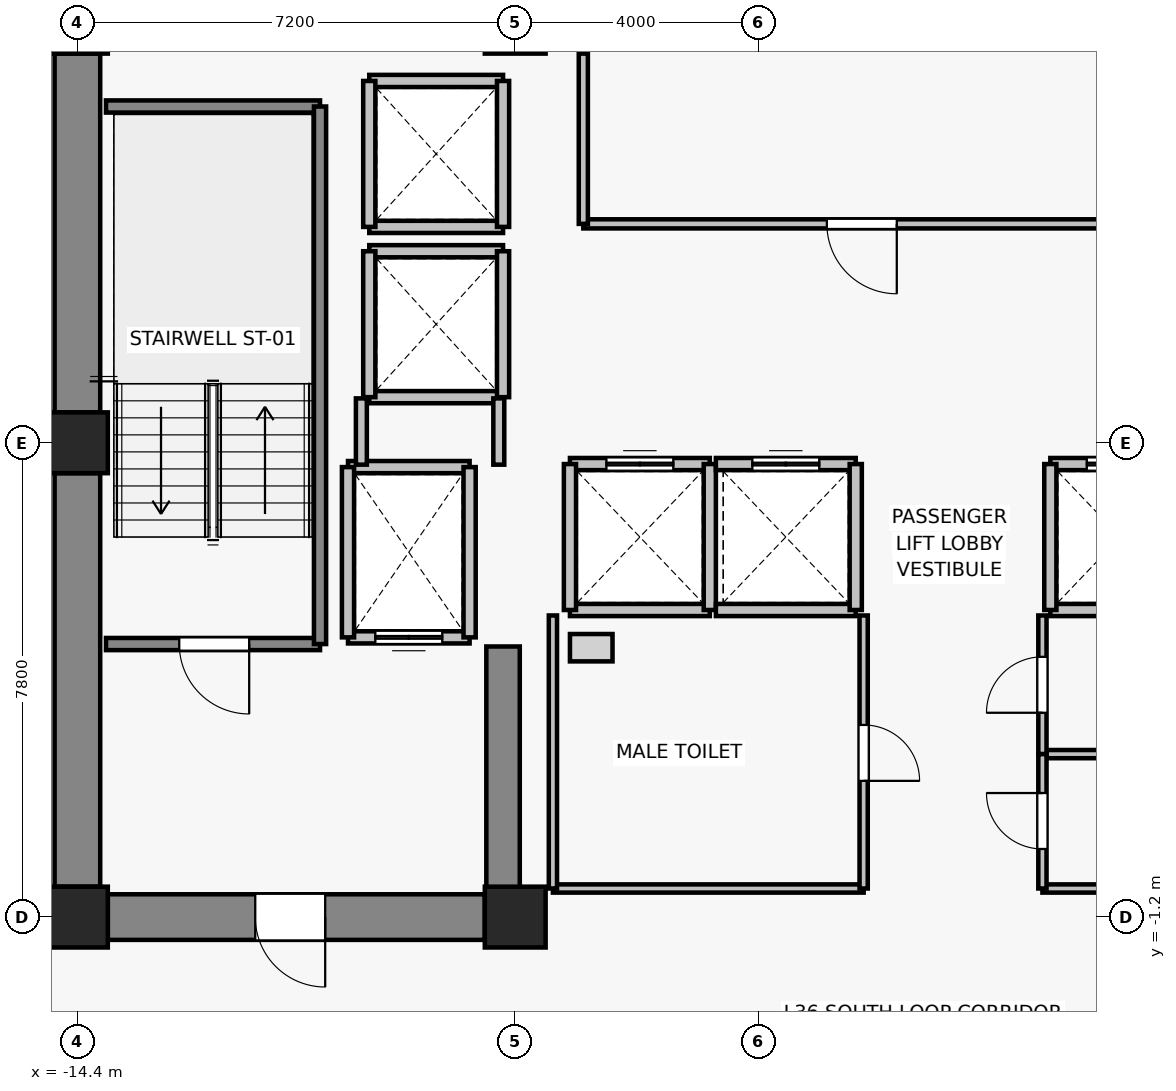
"""IFC4 building model, lengths in metres.
Left out: names, types, materials, properties, quantities, classifications, styles, units other than length and angle.
Written with IfcOpenShell. Run it as: python <this file> out.ifc"""

import sys

from ifc_helpers import new_model, si_unit, direction, frame, frame_2d, origin, origin_2d, place, context, subcontext, project, spatial, rectangle, extrude, source, transform, mapped, element, fill, save


model = new_model("IFC4")
c1 = context("Model", 3, precision=1e-05, world=origin(), true_north=direction((0.0, 1.0)))
c2 = subcontext(c1, "Body", "Model", "MODEL_VIEW")
j1 = project(units=[si_unit("LENGTHUNIT", "METRE"), si_unit("PLANEANGLEUNIT", "RADIAN")], contexts=[c1])
p1 = place(None, origin())
s1 = spatial("IfcSite", under=j1, at=p1, CompositionType="ELEMENT")
p2 = place(p1, origin())
s2 = spatial("IfcBuilding", under=s1, at=p2, CompositionType="ELEMENT")
p3 = place(p2, frame((0.0, 0.0, 129.7)))
s3 = spatial("IfcBuildingStorey", under=s2, at=p3, CompositionType="ELEMENT", Elevation=129.7)
for number, where, z_axis, x_axis in (
    (1, (-14.4, -1.2, 0.0), (0.0, 0.0, 1.0), (1.0, 0.0, 0.0)),
    (2, (-7.2, -1.2, 0.0), (0.0, 0.0, 1.0), (1.0, 0.0, 0.0)),
    (3, (-14.4, 6.6, 0.0), (0.0, 0.0, 1.0), (1.0, 0.0, 0.0)),
    (4, (-14.4, 13.5, 0.0), (0.0, 0.0, 1.0), (1.0, 0.0, 0.0)),
    (5, (-7.2, 13.5, 0.0), (0.0, 0.0, 1.0), (1.0, 0.0, 0.0)),
):
    element("IfcColumn", number, at=place(p3, frame(where, z_axis=z_axis, x_axis=x_axis)), inside=s3, PredefinedType="COLUMN", context=c2, shape_type="SweptSolid", body=[
        extrude(rectangle(XDim=1.0, YDim=1.0, at=origin_2d()), origin(), (0.0, 0.0, 1.0), 3.3),
    ])
p4 = place(p3, frame((-14.4, -0.7, 0.0), z_axis=(0.0, 0.0, 1.0), x_axis=(0.0, 1.0, 0.0)))
e6 = element("IfcWall", 6, at=p4, inside=s3, PredefinedType="SHEAR", context=c2, shape_type="SweptSolid", body=[
    extrude(rectangle(XDim=6.8, YDim=0.75, at=frame_2d((3.4, 0.0))), origin(), (0.0, 0.0, 1.0), 3.075),
])
p5 = place(p3, frame((-14.4, 7.1, 0.0), z_axis=(0.0, 0.0, 1.0), x_axis=(0.0, 1.0, 0.0)))
e7 = element("IfcWall", 7, at=p5, inside=s3, PredefinedType="SHEAR", context=c2, shape_type="SweptSolid", body=[
    extrude(rectangle(XDim=5.9, YDim=0.75, at=frame_2d((2.95, 0.0))), origin(), (0.0, 0.0, 1.0), 3.075),
])
p6 = place(p3, frame((-7.7, -1.2, 0.0), z_axis=(0.0, 0.0, 1.0), x_axis=(-1.0, 0.0, 0.0)))
e8 = element("IfcWall", 8, at=p6, inside=s3, PredefinedType="SHEAR", context=c2, shape_type="SweptSolid", body=[
    extrude(rectangle(XDim=6.2, YDim=0.75, at=frame_2d((3.1, 0.0))), origin(), (0.0, 0.0, 1.0), 3.075),
])
p7 = place(p6, frame((2.625, 0.0, 0.0)))
e9 = element("IfcOpeningElement", 9, at=p7, cuts=e8, PredefinedType="OPENING", context=c2, shape_type="SweptSolid", body=[
    extrude(rectangle(XDim=1.15, YDim=2.15, at=frame_2d((0.575, 1.075))), frame((0.0, 0.385, 0.0), z_axis=(0.0, -1.0, 0.0), x_axis=(1.0, 0.0, 0.0)), (0.0, 0.0, 1.0), 0.77),
])
p8 = place(p3, frame((-7.4, -0.825, 0.0), z_axis=(0.0, 0.0, 1.0), x_axis=(0.0, 1.0, 0.0)))
e10 = element("IfcWall", 10, at=p8, inside=s3, PredefinedType="SHEAR", context=c2, shape_type="SweptSolid", body=[
    extrude(rectangle(XDim=4.075, YDim=0.55, at=frame_2d((2.038, 0.0))), origin(), (0.0, 0.0, 1.0), 3.075),
])
p9 = place(p3, frame((-7.95, 3.4, 0.0), z_axis=(0.0, 0.0, 1.0), x_axis=(-1.0, 0.0, 0.0)))
e11 = element("IfcWall", 11, at=p9, inside=s3, PredefinedType="SOLIDWALL", context=c2, shape_type="SweptSolid", body=[
    extrude(rectangle(XDim=2.0, YDim=0.2, at=frame_2d((1.0, 0.0))), origin(), (0.0, 0.0, 1.0), 3.075),
])
p10 = place(p9, frame((0.45, 0.0, 0.0)))
e12 = element("IfcOpeningElement", 12, at=p10, cuts=e11, PredefinedType="OPENING", context=c2, shape_type="SweptSolid", body=[
    extrude(rectangle(XDim=1.1, YDim=2.2, at=frame_2d((0.55, 1.1))), frame((0.0, 0.11, 0.0), z_axis=(0.0, -1.0, 0.0), x_axis=(1.0, 0.0, 0.0)), (0.0, 0.0, 1.0), 0.22),
])
p11 = place(p3, frame((-9.95, 6.2, 0.0), z_axis=(0.0, 0.0, 1.0), x_axis=(1.0, 0.0, 0.0)))
e13 = element("IfcWall", 13, at=p11, inside=s3, PredefinedType="SOLIDWALL", context=c2, shape_type="SweptSolid", body=[
    extrude(rectangle(XDim=2.0, YDim=0.2, at=frame_2d((1.0, 0.0))), origin(), (0.0, 0.0, 1.0), 3.075),
])
for number, where, z_axis, x_axis in (
    (14, (-9.95, 3.4, 0.0), (0.0, 0.0, 1.0), (0.0, 1.0, 0.0)),
    (15, (-7.95, 6.2, 0.0), (0.0, 0.0, 1.0), (0.0, -1.0, 0.0)),
):
    element("IfcWall", number, at=place(p3, frame(where, z_axis=z_axis, x_axis=x_axis)), inside=s3, PredefinedType="SOLIDWALL", context=c2, shape_type="SweptSolid", body=[
        extrude(rectangle(XDim=2.8, YDim=0.2, at=frame_2d((1.4, 0.0))), origin(), (0.0, 0.0, 1.0), 3.075),
    ])
p12 = place(p3, frame((-4.0, 3.85, 0.0), z_axis=(0.0, 0.0, 1.0), x_axis=(-1.0, 0.0, 0.0)))
e16 = element("IfcWall", 16, at=p12, inside=s3, PredefinedType="SOLIDWALL", context=c2, shape_type="SweptSolid", body=[
    extrude(rectangle(XDim=2.3, YDim=0.2, at=frame_2d((1.15, 0.0))), origin(), (0.0, 0.0, 1.0), 3.075),
])
p13 = place(p3, frame((-6.3, 6.25, 0.0), z_axis=(0.0, 0.0, 1.0), x_axis=(1.0, 0.0, 0.0)))
e17 = element("IfcWall", 17, at=p13, inside=s3, PredefinedType="SOLIDWALL", context=c2, shape_type="SweptSolid", body=[
    extrude(rectangle(XDim=2.3, YDim=0.2, at=frame_2d((1.15, 0.0))), origin(), (0.0, 0.0, 1.0), 3.075),
])
p14 = place(p13, frame((0.6, 0.0, 0.0)))
e18 = element("IfcOpeningElement", 18, at=p14, cuts=e17, PredefinedType="OPENING", context=c2, shape_type="SweptSolid", body=[
    extrude(rectangle(XDim=1.1, YDim=2.2, at=frame_2d((0.55, 1.1))), frame((0.0, 0.11, 0.0), z_axis=(0.0, -1.0, 0.0), x_axis=(1.0, 0.0, 0.0)), (0.0, 0.0, 1.0), 0.22),
])
for number, where, z_axis, x_axis in (
    (19, (-6.3, 3.85, 0.0), (0.0, 0.0, 1.0), (0.0, 1.0, 0.0)),
    (20, (-4.0, 6.25, 0.0), (0.0, 0.0, 1.0), (0.0, -1.0, 0.0)),
):
    element("IfcWall", number, at=place(p3, frame(where, z_axis=z_axis, x_axis=x_axis)), inside=s3, PredefinedType="SOLIDWALL", context=c2, shape_type="SweptSolid", body=[
        extrude(rectangle(XDim=2.4, YDim=0.2, at=frame_2d((1.2, 0.0))), origin(), (0.0, 0.0, 1.0), 3.075),
    ])
p15 = place(p3, frame((-1.6, 3.85, 0.0), z_axis=(0.0, 0.0, 1.0), x_axis=(-1.0, 0.0, 0.0)))
e21 = element("IfcWall", 21, at=p15, inside=s3, PredefinedType="SOLIDWALL", context=c2, shape_type="SweptSolid", body=[
    extrude(rectangle(XDim=2.3, YDim=0.2, at=frame_2d((1.15, 0.0))), origin(), (0.0, 0.0, 1.0), 3.075),
])
p16 = place(p3, frame((-3.9, 6.25, 0.0), z_axis=(0.0, 0.0, 1.0), x_axis=(1.0, 0.0, 0.0)))
e22 = element("IfcWall", 22, at=p16, inside=s3, PredefinedType="SOLIDWALL", context=c2, shape_type="SweptSolid", body=[
    extrude(rectangle(XDim=2.3, YDim=0.2, at=frame_2d((1.15, 0.0))), origin(), (0.0, 0.0, 1.0), 3.075),
])
p17 = place(p16, frame((0.6, 0.0, 0.0)))
e23 = element("IfcOpeningElement", 23, at=p17, cuts=e22, PredefinedType="OPENING", context=c2, shape_type="SweptSolid", body=[
    extrude(rectangle(XDim=1.1, YDim=2.2, at=frame_2d((0.55, 1.1))), frame((0.0, 0.11, 0.0), z_axis=(0.0, -1.0, 0.0), x_axis=(1.0, 0.0, 0.0)), (0.0, 0.0, 1.0), 0.22),
])
p18 = place(p3, frame((-1.6, 6.25, 0.0), z_axis=(0.0, 0.0, 1.0), x_axis=(0.0, -1.0, 0.0)))
e24 = element("IfcWall", 24, at=p18, inside=s3, PredefinedType="SOLIDWALL", context=c2, shape_type="SweptSolid", body=[
    extrude(rectangle(XDim=2.4, YDim=0.2, at=frame_2d((1.2, 0.0))), origin(), (0.0, 0.0, 1.0), 3.075),
])
p19 = place(p3, frame((3.9, 3.85, 0.0), z_axis=(0.0, 0.0, 1.0), x_axis=(-1.0, 0.0, 0.0)))
e25 = element("IfcWall", 25, at=p19, inside=s3, PredefinedType="SOLIDWALL", context=c2, shape_type="SweptSolid", body=[
    extrude(rectangle(XDim=2.3, YDim=0.2, at=frame_2d((1.15, 0.0))), origin(), (0.0, 0.0, 1.0), 3.075),
])
p20 = place(p3, frame((1.6, 6.25, 0.0), z_axis=(0.0, 0.0, 1.0), x_axis=(1.0, 0.0, 0.0)))
e26 = element("IfcWall", 26, at=p20, inside=s3, PredefinedType="SOLIDWALL", context=c2, shape_type="SweptSolid", body=[
    extrude(rectangle(XDim=2.3, YDim=0.2, at=frame_2d((1.15, 0.0))), origin(), (0.0, 0.0, 1.0), 3.075),
])
p21 = place(p20, frame((0.6, 0.0, 0.0)))
e27 = element("IfcOpeningElement", 27, at=p21, cuts=e26, PredefinedType="OPENING", context=c2, shape_type="SweptSolid", body=[
    extrude(rectangle(XDim=1.1, YDim=2.2, at=frame_2d((0.55, 1.1))), frame((0.0, 0.11, 0.0), z_axis=(0.0, -1.0, 0.0), x_axis=(1.0, 0.0, 0.0)), (0.0, 0.0, 1.0), 0.22),
])
p22 = place(p3, frame((1.6, 3.85, 0.0), z_axis=(0.0, 0.0, 1.0), x_axis=(0.0, 1.0, 0.0)))
e28 = element("IfcWall", 28, at=p22, inside=s3, PredefinedType="SOLIDWALL", context=c2, shape_type="SweptSolid", body=[
    extrude(rectangle(XDim=2.4, YDim=0.2, at=frame_2d((1.2, 0.0))), origin(), (0.0, 0.0, 1.0), 3.075),
])
for number, where, z_axis, x_axis in (
    (29, (-7.4, 7.35, 0.0), (0.0, 0.0, 1.0), (-1.0, 0.0, 0.0)),
    (30, (-9.6, 9.75, 0.0), (0.0, 0.0, 1.0), (1.0, 0.0, 0.0)),
):
    element("IfcWall", number, at=place(p3, frame(where, z_axis=z_axis, x_axis=x_axis)), inside=s3, PredefinedType="SOLIDWALL", context=c2, shape_type="SweptSolid", body=[
        extrude(rectangle(XDim=2.2, YDim=0.2, at=frame_2d((1.1, 0.0))), origin(), (0.0, 0.0, 1.0), 2.515),
    ])
p23 = place(p3, frame((-9.6, 7.35, 0.0), z_axis=(0.0, 0.0, 1.0), x_axis=(0.0, 1.0, 0.0)))
e31 = element("IfcWall", 31, at=p23, inside=s3, PredefinedType="SOLIDWALL", context=c2, shape_type="SweptSolid", body=[
    extrude(rectangle(XDim=2.4, YDim=0.2, at=frame_2d((1.2, 0.0))), origin(), (0.0, 0.0, 1.0), 3.075),
])
p24 = place(p3, frame((-7.4, 9.75, 0.0), z_axis=(0.0, 0.0, 1.0), x_axis=(0.0, -1.0, 0.0)))
e32 = element("IfcWall", 32, at=p24, inside=s3, PredefinedType="SOLIDWALL", context=c2, shape_type="SweptSolid", body=[
    extrude(rectangle(XDim=2.4, YDim=0.2, at=frame_2d((1.2, 0.0))), origin(), (0.0, 0.0, 1.0), 2.515),
])
for number, where, z_axis, x_axis in (
    (33, (-7.4, 10.15, 0.0), (0.0, 0.0, 1.0), (-1.0, 0.0, 0.0)),
    (34, (-9.6, 12.55, 0.0), (0.0, 0.0, 1.0), (1.0, 0.0, 0.0)),
):
    element("IfcWall", number, at=place(p3, frame(where, z_axis=z_axis, x_axis=x_axis)), inside=s3, PredefinedType="SOLIDWALL", context=c2, shape_type="SweptSolid", body=[
        extrude(rectangle(XDim=2.2, YDim=0.2, at=frame_2d((1.1, 0.0))), origin(), (0.0, 0.0, 1.0), 2.515),
    ])
p25 = place(p3, frame((-9.6, 10.15, 0.0), z_axis=(0.0, 0.0, 1.0), x_axis=(0.0, 1.0, 0.0)))
e35 = element("IfcWall", 35, at=p25, inside=s3, PredefinedType="SOLIDWALL", context=c2, shape_type="SweptSolid", body=[
    extrude(rectangle(XDim=2.4, YDim=0.2, at=frame_2d((1.2, 0.0))), origin(), (0.0, 0.0, 1.0), 3.075),
])
p26 = place(p3, frame((-7.4, 12.55, 0.0), z_axis=(0.0, 0.0, 1.0), x_axis=(0.0, -1.0, 0.0)))
e36 = element("IfcWall", 36, at=p26, inside=s3, PredefinedType="SOLIDWALL", context=c2, shape_type="SweptSolid", body=[
    extrude(rectangle(XDim=2.4, YDim=0.2, at=frame_2d((1.2, 0.0))), origin(), (0.0, 0.0, 1.0), 2.515),
])
p27 = place(p3, frame((-10.41, 3.29, 0.0), z_axis=(0.0, 0.0, 1.0), x_axis=(-1.0, 0.0, 0.0)))
e37 = element("IfcWall", 37, at=p27, inside=s3, PredefinedType="SOLIDWALL", context=c2, shape_type="SweptSolid", body=[
    extrude(rectangle(XDim=3.52, YDim=0.2, at=frame_2d((1.76, 0.0))), origin(), (0.0, 0.0, 1.0), 3.075),
])
p28 = place(p27, frame((1.165, 0.0, 0.0)))
e38 = element("IfcOpeningElement", 38, at=p28, cuts=e37, PredefinedType="OPENING", context=c2, shape_type="SweptSolid", body=[
    extrude(rectangle(XDim=1.15, YDim=2.15, at=frame_2d((0.575, 1.075))), frame((0.0, 0.11, 0.0), z_axis=(0.0, -1.0, 0.0), x_axis=(1.0, 0.0, 0.0)), (0.0, 0.0, 1.0), 0.22),
])
p29 = place(p3, frame((-13.93, 12.13, 0.0), z_axis=(0.0, 0.0, 1.0), x_axis=(1.0, 0.0, 0.0)))
e39 = element("IfcWall", 39, at=p29, inside=s3, PredefinedType="SOLIDWALL", context=c2, shape_type="SweptSolid", body=[
    extrude(rectangle(XDim=3.52, YDim=0.2, at=frame_2d((1.76, 0.0))), origin(), (0.0, 0.0, 1.0), 3.075),
])
p30 = place(p3, frame((-10.41, 12.13, 0.0), z_axis=(0.0, 0.0, 1.0), x_axis=(0.0, -1.0, 0.0)))
e40 = element("IfcWall", 40, at=p30, inside=s3, PredefinedType="SOLIDWALL", context=c2, shape_type="SweptSolid", body=[
    extrude(rectangle(XDim=8.84, YDim=0.2, at=frame_2d((4.42, 0.0))), origin(), (0.0, 0.0, 1.0), 3.075),
])
p31 = place(p3, frame((-9.73, 6.24, 0.0), z_axis=(0.0, 0.0, 1.0), x_axis=(0.0, 1.0, 0.0)))
e41 = element("IfcWall", 41, at=p31, inside=s3, PredefinedType="PARTITIONING", context=c2, shape_type="SweptSolid", body=[
    extrude(rectangle(XDim=1.09, YDim=0.18, at=frame_2d((0.545, 0.0))), origin(), (0.0, 0.0, 1.0), 3.075),
])
p32 = place(p3, frame((-7.47, 7.33, 0.0), z_axis=(0.0, 0.0, 1.0), x_axis=(0.0, -1.0, 0.0)))
e42 = element("IfcWall", 42, at=p32, inside=s3, PredefinedType="PARTITIONING", context=c2, shape_type="SweptSolid", body=[
    extrude(rectangle(XDim=1.09, YDim=0.18, at=frame_2d((0.545, 0.0))), origin(), (0.0, 0.0, 1.0), 2.515),
])
p33 = place(p3, frame((6.08, 10.2, 0.0), z_axis=(0.0, 0.0, 1.0), x_axis=(-1.0, 0.0, 0.0)))
e43 = element("IfcWall", 43, at=p33, inside=s3, PredefinedType="PARTITIONING", context=c2, shape_type="SweptSolid", body=[
    extrude(rectangle(XDim=12.16, YDim=0.15, at=frame_2d((6.08, 0.0))), origin(), (0.0, 0.0, 1.0), 3.075),
])
p34 = place(p33, frame((7.005, 0.0, 0.0)))
e44 = element("IfcOpeningElement", 44, at=p34, cuts=e43, PredefinedType="OPENING", context=c2, shape_type="SweptSolid", body=[
    extrude(rectangle(XDim=1.15, YDim=2.15, at=frame_2d((0.575, 1.075))), frame((0.0, 0.085, 0.0), z_axis=(0.0, -1.0, 0.0), x_axis=(1.0, 0.0, 0.0)), (0.0, 0.0, 1.0), 0.17),
])
p35 = place(p3, frame((-6.08, 10.2, 0.0), z_axis=(0.0, 0.0, 1.0), x_axis=(0.0, 1.0, 0.0)))
e45 = element("IfcWall", 45, at=p35, inside=s3, PredefinedType="PARTITIONING", context=c2, shape_type="SweptSolid", body=[
    extrude(rectangle(XDim=2.8, YDim=0.15, at=frame_2d((1.4, 0.0))), origin(), (0.0, 0.0, 1.0), 3.075),
])
p36 = place(p3, frame((-1.47, -0.73, 0.0), z_axis=(0.0, 0.0, 1.0), x_axis=(-1.0, 0.0, 0.0)))
e46 = element("IfcWall", 46, at=p36, inside=s3, PredefinedType="PARTITIONING", context=c2, shape_type="SweptSolid", body=[
    extrude(rectangle(XDim=5.11, YDim=0.135, at=frame_2d((2.555, 0.0))), origin(), (0.0, 0.0, 1.0), 3.075),
])
p37 = place(p3, frame((-6.58, -0.73, 0.0), z_axis=(0.0, 0.0, 1.0), x_axis=(0.0, 1.0, 0.0)))
e47 = element("IfcWall", 47, at=p37, inside=s3, PredefinedType="PARTITIONING", context=c2, shape_type="SweptSolid", body=[
    extrude(rectangle(XDim=4.49, YDim=0.135, at=frame_2d((2.245, 0.0))), origin(), (0.0, 0.0, 1.0), 3.075),
])
p38 = place(p3, frame((-1.47, 3.76, 0.0), z_axis=(0.0, 0.0, 1.0), x_axis=(0.0, -1.0, 0.0)))
e48 = element("IfcWall", 48, at=p38, inside=s3, PredefinedType="PARTITIONING", context=c2, shape_type="SweptSolid", body=[
    extrude(rectangle(XDim=4.49, YDim=0.135, at=frame_2d((2.245, 0.0))), origin(), (0.0, 0.0, 1.0), 3.075),
])
p39 = place(p38, frame((1.8, 0.0, 0.0)))
e49 = element("IfcOpeningElement", 49, at=p39, cuts=e48, PredefinedType="OPENING", context=c2, shape_type="SweptSolid", body=[
    extrude(rectangle(XDim=0.92, YDim=2.1, at=frame_2d((0.46, 1.05))), frame((0.0, 0.077, 0.0), z_axis=(0.0, -1.0, 0.0), x_axis=(1.0, 0.0, 0.0)), (0.0, 0.0, 1.0), 0.155),
])
p40 = place(p3, frame((6.58, 1.48, 0.0), z_axis=(0.0, 0.0, 1.0), x_axis=(-1.0, 0.0, 0.0)))
e50 = element("IfcWall", 50, at=p40, inside=s3, PredefinedType="PARTITIONING", context=c2, shape_type="SweptSolid", body=[
    extrude(rectangle(XDim=5.11, YDim=0.135, at=frame_2d((2.555, 0.0))), origin(), (0.0, 0.0, 1.0), 3.075),
])
p41 = place(p3, frame((1.47, 1.48, 0.0), z_axis=(0.0, 0.0, 1.0), x_axis=(0.0, 1.0, 0.0)))
e51 = element("IfcWall", 51, at=p41, inside=s3, PredefinedType="PARTITIONING", context=c2, shape_type="SweptSolid", body=[
    extrude(rectangle(XDim=2.28, YDim=0.135, at=frame_2d((1.14, 0.0))), origin(), (0.0, 0.0, 1.0), 3.075),
])
p42 = place(p41, frame((0.68, 0.0, 0.0)))
e52 = element("IfcOpeningElement", 52, at=p42, cuts=e51, PredefinedType="OPENING", context=c2, shape_type="SweptSolid", body=[
    extrude(rectangle(XDim=0.92, YDim=2.1, at=frame_2d((0.46, 1.05))), frame((0.0, 0.077, 0.0), z_axis=(0.0, -1.0, 0.0), x_axis=(1.0, 0.0, 0.0)), (0.0, 0.0, 1.0), 0.155),
])
p43 = place(p3, frame((4.18, -0.73, 0.0), z_axis=(0.0, 0.0, 1.0), x_axis=(-1.0, 0.0, 0.0)))
e53 = element("IfcWall", 53, at=p43, inside=s3, PredefinedType="PARTITIONING", context=c2, shape_type="SweptSolid", body=[
    extrude(rectangle(XDim=2.71, YDim=0.135, at=frame_2d((1.355, 0.0))), origin(), (0.0, 0.0, 1.0), 3.075),
])
p44 = place(p3, frame((1.47, -0.73, 0.0), z_axis=(0.0, 0.0, 1.0), x_axis=(0.0, 1.0, 0.0)))
e54 = element("IfcWall", 54, at=p44, inside=s3, PredefinedType="PARTITIONING", context=c2, shape_type="SweptSolid", body=[
    extrude(rectangle(XDim=2.21, YDim=0.135, at=frame_2d((1.105, 0.0))), origin(), (0.0, 0.0, 1.0), 3.075),
])
p45 = place(p44, frame((0.65, 0.0, 0.0)))
e55 = element("IfcOpeningElement", 55, at=p45, cuts=e54, PredefinedType="OPENING", context=c2, shape_type="SweptSolid", body=[
    extrude(rectangle(XDim=0.92, YDim=2.1, at=frame_2d((0.46, 1.05))), frame((0.0, 0.077, 0.0), z_axis=(0.0, -1.0, 0.0), x_axis=(1.0, 0.0, 0.0)), (0.0, 0.0, 1.0), 0.155),
])
m1 = source(origin(), c2, "Body", "SweptSolid", [
    extrude(rectangle(XDim=1.1, YDim=2.2, at=frame_2d((0.55, 1.1))), frame((0.0, 0.025, 0.0), z_axis=(0.0, -1.0, 0.0), x_axis=(1.0, 0.0, 0.0)), (0.0, 0.0, 1.0), 0.05),
])
p46 = place(p10, origin())
e56 = element("IfcDoor", 56, at=p46, inside=s3, OperationType="DOUBLE_DOOR_SLIDING", PredefinedType="DOOR", context=c2, shape_type="MappedRepresentation", body=[
    mapped(m1, transform((0.0, 0.0, 0.0), x_axis=(1.0, 0.0, 0.0), y_axis=(0.0, 1.0, 0.0), z_axis=(0.0, 0.0, 1.0), scale=1.0)),
])
fill(e12, e56)
p47 = place(p14, origin())
e57 = element("IfcDoor", 57, at=p47, inside=s3, OperationType="DOUBLE_DOOR_SLIDING", PredefinedType="DOOR", context=c2, shape_type="MappedRepresentation", body=[
    mapped(m1, transform((0.0, 0.0, 0.0), x_axis=(1.0, 0.0, 0.0), y_axis=(0.0, 1.0, 0.0), z_axis=(0.0, 0.0, 1.0), scale=1.0)),
])
fill(e18, e57)
p48 = place(p17, origin())
e58 = element("IfcDoor", 58, at=p48, inside=s3, OperationType="DOUBLE_DOOR_SLIDING", PredefinedType="DOOR", context=c2, shape_type="MappedRepresentation", body=[
    mapped(m1, transform((0.0, 0.0, 0.0), x_axis=(1.0, 0.0, 0.0), y_axis=(0.0, 1.0, 0.0), z_axis=(0.0, 0.0, 1.0), scale=1.0)),
])
fill(e23, e58)
p49 = place(p21, origin())
e59 = element("IfcDoor", 59, at=p49, inside=s3, OperationType="DOUBLE_DOOR_SLIDING", PredefinedType="DOOR", context=c2, shape_type="MappedRepresentation", body=[
    mapped(m1, transform((0.0, 0.0, 0.0), x_axis=(1.0, 0.0, 0.0), y_axis=(0.0, 1.0, 0.0), z_axis=(0.0, 0.0, 1.0), scale=1.0)),
])
fill(e27, e59)
m2 = source(origin(), c2, "Body", "SweptSolid", [
    extrude(rectangle(XDim=1.15, YDim=2.15, at=frame_2d((0.575, 1.075))), frame((0.0, 0.025, 0.0), z_axis=(0.0, -1.0, 0.0), x_axis=(1.0, 0.0, 0.0)), (0.0, 0.0, 1.0), 0.05),
])
p50 = place(p28, origin())
e60 = element("IfcDoor", 60, at=p50, inside=s3, OperationType="SINGLE_SWING_LEFT", PredefinedType="DOOR", context=c2, shape_type="MappedRepresentation", body=[
    mapped(m2, transform((0.0, 0.0, 0.0), x_axis=(1.0, 0.0, 0.0), y_axis=(0.0, 1.0, 0.0), z_axis=(0.0, 0.0, 1.0), scale=1.0)),
])
fill(e38, e60)
p51 = place(p7, origin())
e61 = element("IfcDoor", 61, at=p51, inside=s3, OperationType="SINGLE_SWING_LEFT", PredefinedType="DOOR", context=c2, shape_type="MappedRepresentation", body=[
    mapped(m2, transform((0.0, 0.0, 0.0), x_axis=(1.0, 0.0, 0.0), y_axis=(0.0, 1.0, 0.0), z_axis=(0.0, 0.0, 1.0), scale=1.0)),
])
fill(e9, e61)
p52 = place(p34, origin())
e62 = element("IfcDoor", 62, at=p52, inside=s3, OperationType="SINGLE_SWING_LEFT", PredefinedType="DOOR", context=c2, shape_type="MappedRepresentation", body=[
    mapped(m2, transform((0.0, 0.0, 0.0), x_axis=(1.0, 0.0, 0.0), y_axis=(0.0, 1.0, 0.0), z_axis=(0.0, 0.0, 1.0), scale=1.0)),
])
fill(e44, e62)
m3 = source(origin(), c2, "Body", "SweptSolid", [
    extrude(rectangle(XDim=0.92, YDim=2.1, at=frame_2d((0.46, 1.05))), frame((0.0, 0.025, 0.0), z_axis=(0.0, -1.0, 0.0), x_axis=(1.0, 0.0, 0.0)), (0.0, 0.0, 1.0), 0.05),
])
p53 = place(p39, origin())
e63 = element("IfcDoor", 63, at=p53, inside=s3, OperationType="SINGLE_SWING_RIGHT", PredefinedType="DOOR", context=c2, shape_type="MappedRepresentation", body=[
    mapped(m3, transform((0.0, 0.0, 0.0), x_axis=(1.0, 0.0, 0.0), y_axis=(0.0, 1.0, 0.0), z_axis=(0.0, 0.0, 1.0), scale=1.0)),
])
fill(e49, e63)
p54 = place(p42, origin())
e64 = element("IfcDoor", 64, at=p54, inside=s3, OperationType="SINGLE_SWING_LEFT", PredefinedType="DOOR", context=c2, shape_type="MappedRepresentation", body=[
    mapped(m3, transform((0.0, 0.0, 0.0), x_axis=(1.0, 0.0, 0.0), y_axis=(0.0, 1.0, 0.0), z_axis=(0.0, 0.0, 1.0), scale=1.0)),
])
fill(e52, e64)
p55 = place(p45, origin())
e65 = element("IfcDoor", 65, at=p55, inside=s3, OperationType="SINGLE_SWING_RIGHT", PredefinedType="DOOR", context=c2, shape_type="MappedRepresentation", body=[
    mapped(m3, transform((0.0, 0.0, 0.0), x_axis=(1.0, 0.0, 0.0), y_axis=(0.0, 1.0, 0.0), z_axis=(0.0, 0.0, 1.0), scale=1.0)),
])
fill(e55, e65)
save(model, sys.argv[1])
